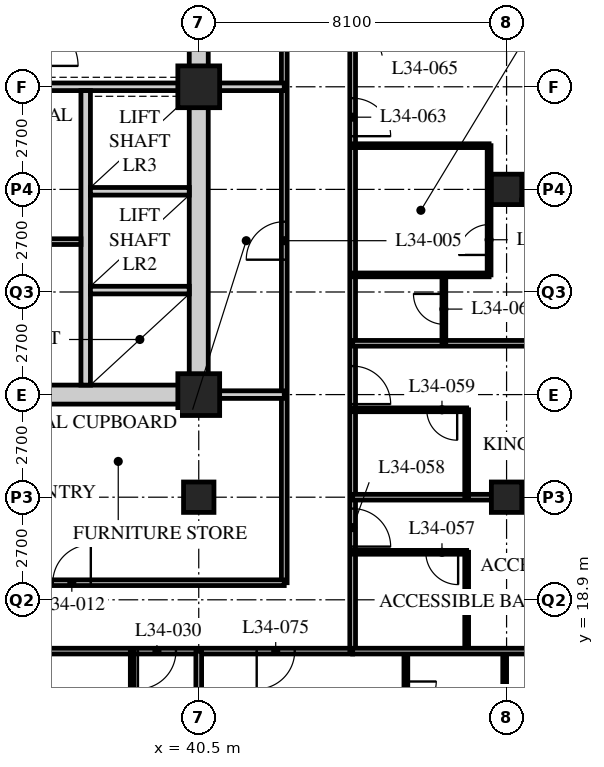
"""IFC4 building model, lengths in metres.
Left out: names, types, materials, properties, quantities, classifications, styles, units other than length and angle.
Written with IfcOpenShell. Run it as: python <this file> out.ifc"""

import sys

from ifc_helpers import new_model, si_unit, direction, frame, frame_2d, origin, origin_2d, place, context, subcontext, project, spatial, rectangle, hollow_rectangle, extrude, element, fill, save


model = new_model("IFC4")
c1 = context("Model", 3, precision=1e-05, world=origin(), true_north=direction((0.0, 1.0)))
c2 = subcontext(c1, "Body", "Model", "MODEL_VIEW")
j1 = project(units=[si_unit("LENGTHUNIT", "METRE"), si_unit("PLANEANGLEUNIT", "RADIAN")], contexts=[c1])
p1 = place(None, origin())
s1 = spatial("IfcSite", under=j1, at=p1, CompositionType="ELEMENT")
p2 = place(p1, origin())
s2 = spatial("IfcBuilding", under=s1, at=p2, CompositionType="ELEMENT")
p3 = place(p2, frame((0.0, 0.0, 134.0)))
s3 = spatial("IfcBuildingStorey", under=s2, at=p3, CompositionType="ELEMENT", Elevation=134.0)
p4 = place(p3, frame((40.5, 21.6, 0.0), z_axis=(0.0, 0.0, 1.0), x_axis=(1.0, 0.0, 0.0)))
e1 = element("IfcColumn", 1, at=p4, inside=s3, PredefinedType="COLUMN", context=c2, shape_type="SweptSolid", body=[
    extrude(hollow_rectangle(XDim=0.8, YDim=0.8, WallThickness=0.08, at=origin_2d()), origin(), (0.0, 0.0, 1.0), 3.4),
])
for number, where, z_axis, x_axis in (
    (2, (40.5, 24.3, 0.0), (0.0, 0.0, 1.0), (1.0, 0.0, 0.0)),
    (3, (40.5, 32.4, 0.0), (0.0, 0.0, 1.0), (1.0, 0.0, 0.0)),
):
    element("IfcColumn", number, at=place(p3, frame(where, z_axis=z_axis, x_axis=x_axis)), inside=s3, PredefinedType="COLUMN", context=c2, shape_type="SweptSolid", body=[
        extrude(hollow_rectangle(XDim=1.1, YDim=1.1, WallThickness=0.1, at=origin_2d()), origin(), (0.0, 0.0, 1.0), 3.4),
    ])
for number, where, z_axis, x_axis in (
    (4, (48.6, 21.6, 0.0), (0.0, 0.0, 1.0), (1.0, 0.0, 0.0)),
    (5, (48.6, 29.7, 0.0), (0.0, 0.0, 1.0), (1.0, 0.0, 0.0)),
):
    element("IfcColumn", number, at=place(p3, frame(where, z_axis=z_axis, x_axis=x_axis)), inside=s3, PredefinedType="COLUMN", context=c2, shape_type="SweptSolid", body=[
        extrude(hollow_rectangle(XDim=0.8, YDim=0.8, WallThickness=0.08, at=origin_2d()), origin(), (0.0, 0.0, 1.0), 3.4),
    ])
p5 = place(p3, frame((8.1, 17.55, 0.0), z_axis=(0.0, 0.0, 1.0), x_axis=(1.0, 0.0, 0.0)))
e6 = element("IfcWall", 6, at=p5, inside=s3, PredefinedType="PARTITIONING", context=c2, shape_type="SweptSolid", body=[
    extrude(rectangle(XDim=36.45, YDim=0.15, at=frame_2d((18.225, 0.0))), origin(), (0.0, 0.0, 1.0), 3.19),
])
p6 = place(p5, frame((9.625, 0.0, 0.0)))
e7 = element("IfcOpeningElement", 7, at=p6, cuts=e6, PredefinedType="OPENING", context=c2, shape_type="SweptSolid", body=[
    extrude(rectangle(XDim=1.0, YDim=2.1, at=frame_2d((0.5, 1.05))), frame((0.0, 0.085, 0.0), z_axis=(0.0, -1.0, 0.0), x_axis=(1.0, 0.0, 0.0)), (0.0, 0.0, 1.0), 0.17),
])
p7 = place(p5, frame((18.1, 0.0, 0.0)))
e8 = element("IfcOpeningElement", 8, at=p7, cuts=e6, PredefinedType="OPENING", context=c2, shape_type="SweptSolid", body=[
    extrude(rectangle(XDim=1.0, YDim=2.1, at=frame_2d((0.5, 1.05))), frame((0.0, 0.085, 0.0), z_axis=(0.0, -1.0, 0.0), x_axis=(1.0, 0.0, 0.0)), (0.0, 0.0, 1.0), 0.17),
])
p8 = place(p5, frame((26.75, 0.0, 0.0)))
e9 = element("IfcOpeningElement", 9, at=p8, cuts=e6, PredefinedType="OPENING", context=c2, shape_type="SweptSolid", body=[
    extrude(rectangle(XDim=1.0, YDim=2.1, at=frame_2d((0.5, 1.05))), frame((0.0, 0.085, 0.0), z_axis=(0.0, -1.0, 0.0), x_axis=(1.0, 0.0, 0.0)), (0.0, 0.0, 1.0), 0.17),
])
p9 = place(p5, frame((30.8, 0.0, 0.0)))
e10 = element("IfcOpeningElement", 10, at=p9, cuts=e6, PredefinedType="OPENING", context=c2, shape_type="SweptSolid", body=[
    extrude(rectangle(XDim=1.0, YDim=2.1, at=frame_2d((0.5, 1.05))), frame((0.0, 0.085, 0.0), z_axis=(0.0, -1.0, 0.0), x_axis=(1.0, 0.0, 0.0)), (0.0, 0.0, 1.0), 0.17),
])
p10 = place(p5, frame((1.525, 0.0, 0.0)))
e11 = element("IfcOpeningElement", 11, at=p10, cuts=e6, PredefinedType="OPENING", context=c2, shape_type="SweptSolid", body=[
    extrude(rectangle(XDim=1.0, YDim=2.1, at=frame_2d((0.5, 1.05))), frame((0.0, 0.085, 0.0), z_axis=(0.0, -1.0, 0.0), x_axis=(1.0, 0.0, 0.0)), (0.0, 0.0, 1.0), 0.17),
])
p11 = place(p5, frame((33.925, 0.0, 0.0)))
e12 = element("IfcOpeningElement", 12, at=p11, cuts=e6, PredefinedType="OPENING", context=c2, shape_type="SweptSolid", body=[
    extrude(rectangle(XDim=1.0, YDim=2.1, at=frame_2d((0.5, 1.05))), frame((0.0, 0.085, 0.0), z_axis=(0.0, -1.0, 0.0), x_axis=(1.0, 0.0, 0.0)), (0.0, 0.0, 1.0), 0.17),
])
p12 = place(p3, frame((44.55, 17.55, 0.0), z_axis=(0.0, 0.0, 1.0), x_axis=(0.0, 1.0, 0.0)))
e13 = element("IfcWall", 13, at=p12, inside=s3, PredefinedType="PARTITIONING", context=c2, shape_type="SweptSolid", body=[
    extrude(rectangle(XDim=28.35, YDim=0.15, at=frame_2d((14.175, 0.0))), origin(), (0.0, 0.0, 1.0), 3.19),
])
p13 = place(p12, frame((2.75, 0.0, 0.0)))
e14 = element("IfcOpeningElement", 14, at=p13, cuts=e13, PredefinedType="OPENING", context=c2, shape_type="SweptSolid", body=[
    extrude(rectangle(XDim=1.0, YDim=2.1, at=frame_2d((0.5, 1.05))), frame((0.0, 0.085, 0.0), z_axis=(0.0, -1.0, 0.0), x_axis=(1.0, 0.0, 0.0)), (0.0, 0.0, 1.0), 0.17),
])
p14 = place(p12, frame((6.5, 0.0, 0.0)))
e15 = element("IfcOpeningElement", 15, at=p14, cuts=e13, PredefinedType="OPENING", context=c2, shape_type="SweptSolid", body=[
    extrude(rectangle(XDim=1.0, YDim=2.1, at=frame_2d((0.5, 1.05))), frame((0.0, 0.085, 0.0), z_axis=(0.0, -1.0, 0.0), x_axis=(1.0, 0.0, 0.0)), (0.0, 0.0, 1.0), 0.17),
])
p15 = place(p12, frame((13.55, 0.0, 0.0)))
e16 = element("IfcOpeningElement", 16, at=p15, cuts=e13, PredefinedType="OPENING", context=c2, shape_type="SweptSolid", body=[
    extrude(rectangle(XDim=1.0, YDim=2.1, at=frame_2d((0.5, 1.05))), frame((0.0, 0.085, 0.0), z_axis=(0.0, -1.0, 0.0), x_axis=(1.0, 0.0, 0.0)), (0.0, 0.0, 1.0), 0.17),
])
p16 = place(p12, frame((18.1, 0.0, 0.0)))
e17 = element("IfcOpeningElement", 17, at=p16, cuts=e13, PredefinedType="OPENING", context=c2, shape_type="SweptSolid", body=[
    extrude(rectangle(XDim=1.0, YDim=2.1, at=frame_2d((0.5, 1.05))), frame((0.0, 0.085, 0.0), z_axis=(0.0, -1.0, 0.0), x_axis=(1.0, 0.0, 0.0)), (0.0, 0.0, 1.0), 0.17),
])
p17 = place(p12, frame((26.75, 0.0, 0.0)))
e18 = element("IfcOpeningElement", 18, at=p17, cuts=e13, PredefinedType="OPENING", context=c2, shape_type="SweptSolid", body=[
    extrude(rectangle(XDim=1.0, YDim=2.1, at=frame_2d((0.5, 1.05))), frame((0.0, 0.085, 0.0), z_axis=(0.0, -1.0, 0.0), x_axis=(1.0, 0.0, 0.0)), (0.0, 0.0, 1.0), 0.17),
])
p18 = place(p3, frame((42.75, 19.35, 0.0), z_axis=(0.0, 0.0, 1.0), x_axis=(0.0, 1.0, 0.0)))
e19 = element("IfcWall", 19, at=p18, inside=s3, PredefinedType="PARTITIONING", context=c2, shape_type="SweptSolid", body=[
    extrude(rectangle(XDim=24.75, YDim=0.15, at=frame_2d((12.375, 0.0))), origin(), (0.0, 0.0, 1.0), 3.19),
])
p19 = place(p18, frame((8.5, 0.0, 0.0)))
e20 = element("IfcOpeningElement", 20, at=p19, cuts=e19, PredefinedType="OPENING", context=c2, shape_type="SweptSolid", body=[
    extrude(rectangle(XDim=1.0, YDim=2.1, at=frame_2d((0.5, 1.05))), frame((0.0, 0.085, 0.0), z_axis=(0.0, -1.0, 0.0), x_axis=(1.0, 0.0, 0.0)), (0.0, 0.0, 1.0), 0.17),
])
p20 = place(p18, frame((16.6, 0.0, 0.0)))
e21 = element("IfcOpeningElement", 21, at=p20, cuts=e19, PredefinedType="OPENING", context=c2, shape_type="SweptSolid", body=[
    extrude(rectangle(XDim=1.0, YDim=2.1, at=frame_2d((0.5, 1.05))), frame((0.0, 0.085, 0.0), z_axis=(0.0, -1.0, 0.0), x_axis=(1.0, 0.0, 0.0)), (0.0, 0.0, 1.0), 0.17),
])
p21 = place(p3, frame((29.56, 19.35, 0.0), z_axis=(0.0, 0.0, 1.0), x_axis=(1.0, 0.0, 0.0)))
e22 = element("IfcWall", 22, at=p21, inside=s3, PredefinedType="PARTITIONING", context=c2, shape_type="SweptSolid", body=[
    extrude(rectangle(XDim=13.19, YDim=0.15, at=frame_2d((6.595, 0.0))), origin(), (0.0, 0.0, 1.0), 3.19),
])
p22 = place(p21, frame((0.5, 0.0, 0.0)))
e23 = element("IfcOpeningElement", 23, at=p22, cuts=e22, PredefinedType="OPENING", context=c2, shape_type="SweptSolid", body=[
    extrude(rectangle(XDim=1.0, YDim=2.1, at=frame_2d((0.5, 1.05))), frame((0.0, 0.085, 0.0), z_axis=(0.0, -1.0, 0.0), x_axis=(1.0, 0.0, 0.0)), (0.0, 0.0, 1.0), 0.17),
])
p23 = place(p21, frame((7.1, 0.0, 0.0)))
e24 = element("IfcOpeningElement", 24, at=p23, cuts=e22, PredefinedType="OPENING", context=c2, shape_type="SweptSolid", body=[
    extrude(rectangle(XDim=1.0, YDim=2.1, at=frame_2d((0.5, 1.05))), frame((0.0, 0.085, 0.0), z_axis=(0.0, -1.0, 0.0), x_axis=(1.0, 0.0, 0.0)), (0.0, 0.0, 1.0), 0.17),
])
for number, where, z_axis, x_axis in (
    (25, (40.5, 32.4, 0.0), (0.0, 0.0, 1.0), (1.0, 0.0, 0.0)),
    (26, (40.5, 24.3, 0.0), (0.0, 0.0, 1.0), (1.0, 0.0, 0.0)),
):
    element("IfcWall", number, at=place(p3, frame(where, z_axis=z_axis, x_axis=x_axis)), inside=s3, PredefinedType="SOLIDWALL", context=c2, shape_type="SweptSolid", body=[
        extrude(rectangle(XDim=2.25, YDim=0.2, at=frame_2d((1.125, 0.0))), origin(), (0.0, 0.0, 1.0), 3.19),
    ])
p24 = place(p3, frame((38.75, 17.55, 0.0), z_axis=(0.0, 0.0, 1.0), x_axis=(0.0, -1.0, 0.0)))
e27 = element("IfcWall", 27, at=p24, inside=s3, PredefinedType="PARTITIONING", context=c2, shape_type="SweptSolid", body=[
    extrude(rectangle(XDim=3.0, YDim=0.1, at=frame_2d((1.5, 0.0))), origin(), (0.0, 0.0, 1.0), 3.19),
])
p25 = place(p24, frame((1.95, 0.0, 0.0)))
e28 = element("IfcOpeningElement", 28, at=p25, cuts=e27, PredefinedType="OPENING", context=c2, shape_type="SweptSolid", body=[
    extrude(rectangle(XDim=0.8, YDim=2.1, at=frame_2d((0.4, 1.05))), frame((0.0, 0.06, 0.0), z_axis=(0.0, -1.0, 0.0), x_axis=(1.0, 0.0, 0.0)), (0.0, 0.0, 1.0), 0.12),
])
p26 = place(p3, frame((47.55, 17.55, 0.0), z_axis=(0.0, 0.0, 1.0), x_axis=(0.0, 1.0, 0.0)))
e29 = element("IfcWall", 29, at=p26, inside=s3, PredefinedType="PARTITIONING", context=c2, shape_type="SweptSolid", body=[
    extrude(rectangle(XDim=2.6, YDim=0.1, at=frame_2d((1.3, 0.0))), origin(), (0.0, 0.0, 1.0), 3.19),
])
p27 = place(p3, frame((44.55, 20.15, 0.0), z_axis=(0.0, 0.0, 1.0), x_axis=(1.0, 0.0, 0.0)))
e30 = element("IfcWall", 30, at=p27, inside=s3, PredefinedType="PARTITIONING", context=c2, shape_type="SweptSolid", body=[
    extrude(rectangle(XDim=3.0, YDim=0.1, at=frame_2d((1.5, 0.0))), origin(), (0.0, 0.0, 1.0), 3.19),
])
p28 = place(p27, frame((1.925, 0.0, 0.0)))
e31 = element("IfcOpeningElement", 31, at=p28, cuts=e30, PredefinedType="OPENING", context=c2, shape_type="SweptSolid", body=[
    extrude(rectangle(XDim=0.85, YDim=2.1, at=frame_2d((0.425, 1.05))), frame((0.0, 0.06, 0.0), z_axis=(0.0, -1.0, 0.0), x_axis=(1.0, 0.0, 0.0)), (0.0, 0.0, 1.0), 0.12),
])
p29 = place(p3, frame((44.55, 21.6, 0.0), z_axis=(0.0, 0.0, 1.0), x_axis=(1.0, 0.0, 0.0)))
e32 = element("IfcWall", 32, at=p29, inside=s3, PredefinedType="PARTITIONING", context=c2, shape_type="SweptSolid", body=[
    extrude(rectangle(XDim=11.85, YDim=0.15, at=frame_2d((5.925, 0.0))), origin(), (0.0, 0.0, 1.0), 2.578),
])
p30 = place(p3, frame((47.55, 21.6, 0.0), z_axis=(0.0, 0.0, 1.0), x_axis=(0.0, 1.0, 0.0)))
e33 = element("IfcWall", 33, at=p30, inside=s3, PredefinedType="PARTITIONING", context=c2, shape_type="SweptSolid", body=[
    extrude(rectangle(XDim=2.3, YDim=0.1, at=frame_2d((1.15, 0.0))), origin(), (0.0, 0.0, 1.0), 3.19),
])
p31 = place(p3, frame((44.55, 23.9, 0.0), z_axis=(0.0, 0.0, 1.0), x_axis=(1.0, 0.0, 0.0)))
e34 = element("IfcWall", 34, at=p31, inside=s3, PredefinedType="PARTITIONING", context=c2, shape_type="SweptSolid", body=[
    extrude(rectangle(XDim=3.0, YDim=0.1, at=frame_2d((1.5, 0.0))), origin(), (0.0, 0.0, 1.0), 3.19),
])
p32 = place(p31, frame((1.95, 0.0, 0.0)))
e35 = element("IfcOpeningElement", 35, at=p32, cuts=e34, PredefinedType="OPENING", context=c2, shape_type="SweptSolid", body=[
    extrude(rectangle(XDim=0.8, YDim=2.1, at=frame_2d((0.4, 1.05))), frame((0.0, 0.06, 0.0), z_axis=(0.0, -1.0, 0.0), x_axis=(1.0, 0.0, 0.0)), (0.0, 0.0, 1.0), 0.12),
])
p33 = place(p3, frame((44.55, 25.65, 0.0), z_axis=(0.0, 0.0, 1.0), x_axis=(1.0, 0.0, 0.0)))
e36 = element("IfcWall", 36, at=p33, inside=s3, PredefinedType="PARTITIONING", context=c2, shape_type="SweptSolid", body=[
    extrude(rectangle(XDim=11.85, YDim=0.15, at=frame_2d((5.925, 0.0))), origin(), (0.0, 0.0, 1.0), 3.19),
])
p34 = place(p3, frame((48.14, 27.45, 0.0), z_axis=(0.0, 0.0, 1.0), x_axis=(0.0, 1.0, 0.0)))
e37 = element("IfcWall", 37, at=p34, inside=s3, PredefinedType="PARTITIONING", context=c2, shape_type="SweptSolid", body=[
    extrude(rectangle(XDim=3.4, YDim=0.1, at=frame_2d((1.7, 0.0))), origin(), (0.0, 0.0, 1.0), 3.19),
])
p35 = place(p34, frame((0.525, 0.0, 0.0)))
e38 = element("IfcOpeningElement", 38, at=p35, cuts=e37, PredefinedType="OPENING", context=c2, shape_type="SweptSolid", body=[
    extrude(rectangle(XDim=0.8, YDim=2.1, at=frame_2d((0.4, 1.05))), frame((0.0, 0.06, 0.0), z_axis=(0.0, -1.0, 0.0), x_axis=(1.0, 0.0, 0.0)), (0.0, 0.0, 1.0), 0.12),
])
p36 = place(p3, frame((46.95, 25.65, 0.0), z_axis=(0.0, 0.0, 1.0), x_axis=(0.0, 1.0, 0.0)))
e39 = element("IfcWall", 39, at=p36, inside=s3, PredefinedType="PARTITIONING", context=c2, shape_type="SweptSolid", body=[
    extrude(rectangle(XDim=1.8, YDim=0.1, at=frame_2d((0.9, 0.0))), origin(), (0.0, 0.0, 1.0), 3.19),
])
p37 = place(p36, frame((0.5, 0.0, 0.0)))
e40 = element("IfcOpeningElement", 40, at=p37, cuts=e39, PredefinedType="OPENING", context=c2, shape_type="SweptSolid", body=[
    extrude(rectangle(XDim=0.8, YDim=2.1, at=frame_2d((0.4, 1.05))), frame((0.0, 0.06, 0.0), z_axis=(0.0, -1.0, 0.0), x_axis=(1.0, 0.0, 0.0)), (0.0, 0.0, 1.0), 0.12),
])
for number, where, z_axis, x_axis in (
    (41, (44.55, 27.45, 0.0), (0.0, 0.0, 1.0), (1.0, 0.0, 0.0)),
    (42, (44.55, 30.85, 0.0), (0.0, 0.0, 1.0), (1.0, 0.0, 0.0)),
):
    element("IfcWall", number, at=place(p3, frame(where, z_axis=z_axis, x_axis=x_axis)), inside=s3, PredefinedType="PARTITIONING", context=c2, shape_type="SweptSolid", body=[
        extrude(rectangle(XDim=3.59, YDim=0.1, at=frame_2d((1.795, 0.0))), origin(), (0.0, 0.0, 1.0), 3.19),
    ])
p38 = place(p3, frame((45.95, 17.55, 0.0), z_axis=(0.0, 0.0, 1.0), x_axis=(0.0, -1.0, 0.0)))
e43 = element("IfcWall", 43, at=p38, inside=s3, PredefinedType="PARTITIONING", context=c2, shape_type="SweptSolid", body=[
    extrude(rectangle(XDim=2.4, YDim=0.1, at=frame_2d((1.2, 0.0))), origin(), (0.0, 0.0, 1.0), 3.19),
])
p39 = place(p38, frame((0.8, 0.0, 0.0)))
e44 = element("IfcOpeningElement", 44, at=p39, cuts=e43, PredefinedType="OPENING", context=c2, shape_type="SweptSolid", body=[
    extrude(rectangle(XDim=0.8, YDim=2.1, at=frame_2d((0.4, 1.05))), frame((0.0, 0.06, 0.0), z_axis=(0.0, -1.0, 0.0), x_axis=(1.0, 0.0, 0.0)), (0.0, 0.0, 1.0), 0.12),
])
p40 = place(p3, frame((48.55, 17.55, 0.0), z_axis=(0.0, 0.0, 1.0), x_axis=(0.0, -1.0, 0.0)))
e45 = element("IfcWall", 45, at=p40, inside=s3, PredefinedType="PARTITIONING", context=c2, shape_type="SweptSolid", body=[
    extrude(rectangle(XDim=2.4, YDim=0.1, at=frame_2d((1.2, 0.0))), origin(), (0.0, 0.0, 1.0), 2.578),
])
p41 = place(p3, frame((44.55, 17.55, 0.0), z_axis=(0.0, 0.0, 1.0), x_axis=(1.0, 0.0, 0.0)))
e46 = element("IfcWall", 46, at=p41, inside=s3, PredefinedType="PARTITIONING", context=c2, shape_type="SweptSolid", body=[
    extrude(rectangle(XDim=11.85, YDim=0.15, at=frame_2d((5.925, 0.0))), origin(), (0.0, 0.0, 1.0), 3.19),
])
p42 = place(p3, frame((40.5, 17.55, 0.0), z_axis=(0.0, 0.0, 1.0), x_axis=(0.0, -1.0, 0.0)))
e47 = element("IfcWall", 47, at=p42, inside=s3, PredefinedType="PARTITIONING", context=c2, shape_type="SweptSolid", body=[
    extrude(rectangle(XDim=11.85, YDim=0.15, at=frame_2d((5.925, 0.0))), origin(), (0.0, 0.0, 1.0), 2.578),
])
p43 = place(p3, frame((15.95, 24.3, 0.0), z_axis=(0.0, 0.0, 1.0), x_axis=(1.0, 0.0, 0.0)))
e48 = element("IfcWall", 48, at=p43, inside=s3, PredefinedType="SOLIDWALL", context=c2, shape_type="SweptSolid", body=[
    extrude(rectangle(XDim=24.8, YDim=0.5, at=frame_2d((12.4, 0.0))), origin(), (0.0, 0.0, 1.0), 2.54),
])
p44 = place(p43, frame((11.5, 0.0, 0.0)))
e49 = element("IfcOpeningElement", 49, at=p44, cuts=e48, PredefinedType="OPENING", context=c2, shape_type="SweptSolid", body=[
    extrude(rectangle(XDim=1.8, YDim=2.4, at=frame_2d((0.9, 1.2))), frame((0.0, 0.26, 0.0), z_axis=(0.0, -1.0, 0.0), x_axis=(1.0, 0.0, 0.0)), (0.0, 0.0, 1.0), 0.52),
])
p45 = place(p3, frame((40.5, 24.55, 0.0), z_axis=(0.0, 0.0, 1.0), x_axis=(0.0, 1.0, 0.0)))
e50 = element("IfcWall", 50, at=p45, inside=s3, PredefinedType="SOLIDWALL", context=c2, shape_type="SweptSolid", body=[
    extrude(rectangle(XDim=15.7, YDim=0.5, at=frame_2d((7.85, 0.0))), origin(), (0.0, 0.0, 1.0), 2.578),
])
p46 = place(p3, frame((32.3, 32.4, 0.0), z_axis=(0.0, 0.0, 1.0), x_axis=(1.0, 0.0, 0.0)))
e51 = element("IfcWall", 51, at=p46, inside=s3, PredefinedType="SOLIDWALL", context=c2, shape_type="SweptSolid", body=[
    extrude(rectangle(XDim=7.95, YDim=0.2, at=frame_2d((3.975, 0.0))), origin(), (0.0, 0.0, 1.0), 2.578),
])
p47 = place(p3, frame((37.525, 24.55, 0.0), z_axis=(0.0, 0.0, 1.0), x_axis=(0.0, 1.0, 0.0)))
e52 = element("IfcWall", 52, at=p47, inside=s3, PredefinedType="SOLIDWALL", context=c2, shape_type="SweptSolid", body=[
    extrude(rectangle(XDim=7.75, YDim=0.25, at=frame_2d((3.875, 0.0))), origin(), (0.0, 0.0, 1.0), 3.19),
])
for number, where, z_axis, x_axis in (
    (53, (37.65, 27.05, 0.0), (0.0, 0.0, 1.0), (1.0, 0.0, 0.0)),
    (54, (37.65, 29.65, 0.0), (0.0, 0.0, 1.0), (1.0, 0.0, 0.0)),
):
    element("IfcWall", number, at=place(p3, frame(where, z_axis=z_axis, x_axis=x_axis)), inside=s3, PredefinedType="SOLIDWALL", context=c2, shape_type="SweptSolid", body=[
        extrude(rectangle(XDim=2.6, YDim=0.2, at=frame_2d((1.3, 0.0))), origin(), (0.0, 0.0, 1.0), 3.19),
    ])
p48 = place(p3, frame((32.5, 28.325, 0.0), z_axis=(0.0, 0.0, 1.0), x_axis=(1.0, 0.0, 0.0)))
e55 = element("IfcWall", 55, at=p48, inside=s3, PredefinedType="PARTITIONING", context=c2, shape_type="SweptSolid", body=[
    extrude(rectangle(XDim=4.9, YDim=0.15, at=frame_2d((2.45, 0.0))), origin(), (0.0, 0.0, 1.0), 3.19),
])
p49 = place(p19, origin())
e56 = element("IfcDoor", 56, at=p49, inside=s3, OperationType="SINGLE_SWING_LEFT", PredefinedType="DOOR", context=c2, shape_type="SweptSolid", body=[
    extrude(rectangle(XDim=1.0, YDim=2.1, at=frame_2d((0.5, 1.05))), frame((0.0, 0.025, 0.0), z_axis=(0.0, -1.0, 0.0), x_axis=(1.0, 0.0, 0.0)), (0.0, 0.0, 1.0), 0.05),
])
fill(e20, e56)
p50 = place(p23, origin())
e57 = element("IfcDoor", 57, at=p50, inside=s3, OperationType="SINGLE_SWING_RIGHT", PredefinedType="DOOR", context=c2, shape_type="SweptSolid", body=[
    extrude(rectangle(XDim=1.0, YDim=2.1, at=frame_2d((0.5, 1.05))), frame((0.0, 0.025, 0.0), z_axis=(0.0, -1.0, 0.0), x_axis=(1.0, 0.0, 0.0)), (0.0, 0.0, 1.0), 0.05),
])
fill(e24, e57)
p51 = place(p9, origin())
e58 = element("IfcDoor", 58, at=p51, inside=s3, OperationType="SINGLE_SWING_RIGHT", PredefinedType="DOOR", context=c2, shape_type="SweptSolid", body=[
    extrude(rectangle(XDim=1.0, YDim=2.1, at=frame_2d((0.5, 1.05))), frame((0.0, 0.025, 0.0), z_axis=(0.0, -1.0, 0.0), x_axis=(1.0, 0.0, 0.0)), (0.0, 0.0, 1.0), 0.05),
])
fill(e10, e58)
p52 = place(p28, origin())
e59 = element("IfcDoor", 59, at=p52, inside=s3, OperationType="SINGLE_SWING_LEFT", PredefinedType="DOOR", context=c2, shape_type="SweptSolid", body=[
    extrude(rectangle(XDim=0.85, YDim=2.1, at=frame_2d((0.425, 1.05))), frame((0.0, 0.025, 0.0), z_axis=(0.0, -1.0, 0.0), x_axis=(1.0, 0.0, 0.0)), (0.0, 0.0, 1.0), 0.05),
])
fill(e31, e59)
p53 = place(p13, origin())
e60 = element("IfcDoor", 60, at=p53, inside=s3, OperationType="SINGLE_SWING_RIGHT", PredefinedType="DOOR", context=c2, shape_type="SweptSolid", body=[
    extrude(rectangle(XDim=1.0, YDim=2.1, at=frame_2d((0.5, 1.05))), frame((0.0, 0.025, 0.0), z_axis=(0.0, -1.0, 0.0), x_axis=(1.0, 0.0, 0.0)), (0.0, 0.0, 1.0), 0.05),
])
fill(e14, e60)
p54 = place(p32, origin())
e61 = element("IfcDoor", 61, at=p54, inside=s3, OperationType="SINGLE_SWING_LEFT", PredefinedType="DOOR", context=c2, shape_type="SweptSolid", body=[
    extrude(rectangle(XDim=0.8, YDim=2.1, at=frame_2d((0.4, 1.05))), frame((0.0, 0.025, 0.0), z_axis=(0.0, -1.0, 0.0), x_axis=(1.0, 0.0, 0.0)), (0.0, 0.0, 1.0), 0.05),
])
fill(e35, e61)
p55 = place(p14, origin())
e62 = element("IfcDoor", 62, at=p55, inside=s3, OperationType="SINGLE_SWING_RIGHT", PredefinedType="DOOR", context=c2, shape_type="SweptSolid", body=[
    extrude(rectangle(XDim=1.0, YDim=2.1, at=frame_2d((0.5, 1.05))), frame((0.0, 0.025, 0.0), z_axis=(0.0, -1.0, 0.0), x_axis=(1.0, 0.0, 0.0)), (0.0, 0.0, 1.0), 0.05),
])
fill(e15, e62)
p56 = place(p35, origin())
e63 = element("IfcDoor", 63, at=p56, inside=s3, OperationType="SINGLE_SWING_LEFT", PredefinedType="DOOR", context=c2, shape_type="SweptSolid", body=[
    extrude(rectangle(XDim=0.8, YDim=2.1, at=frame_2d((0.4, 1.05))), frame((0.0, 0.025, 0.0), z_axis=(0.0, -1.0, 0.0), x_axis=(1.0, 0.0, 0.0)), (0.0, 0.0, 1.0), 0.05),
])
fill(e38, e63)
p57 = place(p37, origin())
e64 = element("IfcDoor", 64, at=p57, inside=s3, OperationType="SINGLE_SWING_RIGHT", PredefinedType="DOOR", context=c2, shape_type="SweptSolid", body=[
    extrude(rectangle(XDim=0.8, YDim=2.1, at=frame_2d((0.4, 1.05))), frame((0.0, 0.025, 0.0), z_axis=(0.0, -1.0, 0.0), x_axis=(1.0, 0.0, 0.0)), (0.0, 0.0, 1.0), 0.05),
])
fill(e40, e64)
p58 = place(p15, origin())
e65 = element("IfcDoor", 65, at=p58, inside=s3, OperationType="SINGLE_SWING_RIGHT", PredefinedType="DOOR", context=c2, shape_type="SweptSolid", body=[
    extrude(rectangle(XDim=1.0, YDim=2.1, at=frame_2d((0.5, 1.05))), frame((0.0, 0.025, 0.0), z_axis=(0.0, -1.0, 0.0), x_axis=(1.0, 0.0, 0.0)), (0.0, 0.0, 1.0), 0.05),
])
fill(e16, e65)
p59 = place(p11, origin())
e66 = element("IfcDoor", 66, at=p59, inside=s3, OperationType="SINGLE_SWING_RIGHT", PredefinedType="DOOR", context=c2, shape_type="SweptSolid", body=[
    extrude(rectangle(XDim=1.0, YDim=2.1, at=frame_2d((0.5, 1.05))), frame((0.0, 0.025, 0.0), z_axis=(0.0, -1.0, 0.0), x_axis=(1.0, 0.0, 0.0)), (0.0, 0.0, 1.0), 0.05),
])
fill(e12, e66)
p60 = place(p39, origin())
e67 = element("IfcDoor", 67, at=p60, inside=s3, OperationType="SINGLE_SWING_LEFT", PredefinedType="DOOR", context=c2, shape_type="SweptSolid", body=[
    extrude(rectangle(XDim=0.8, YDim=2.1, at=frame_2d((0.4, 1.05))), frame((0.0, 0.025, 0.0), z_axis=(0.0, -1.0, 0.0), x_axis=(1.0, 0.0, 0.0)), (0.0, 0.0, 1.0), 0.05),
])
fill(e44, e67)
save(model, sys.argv[1])
